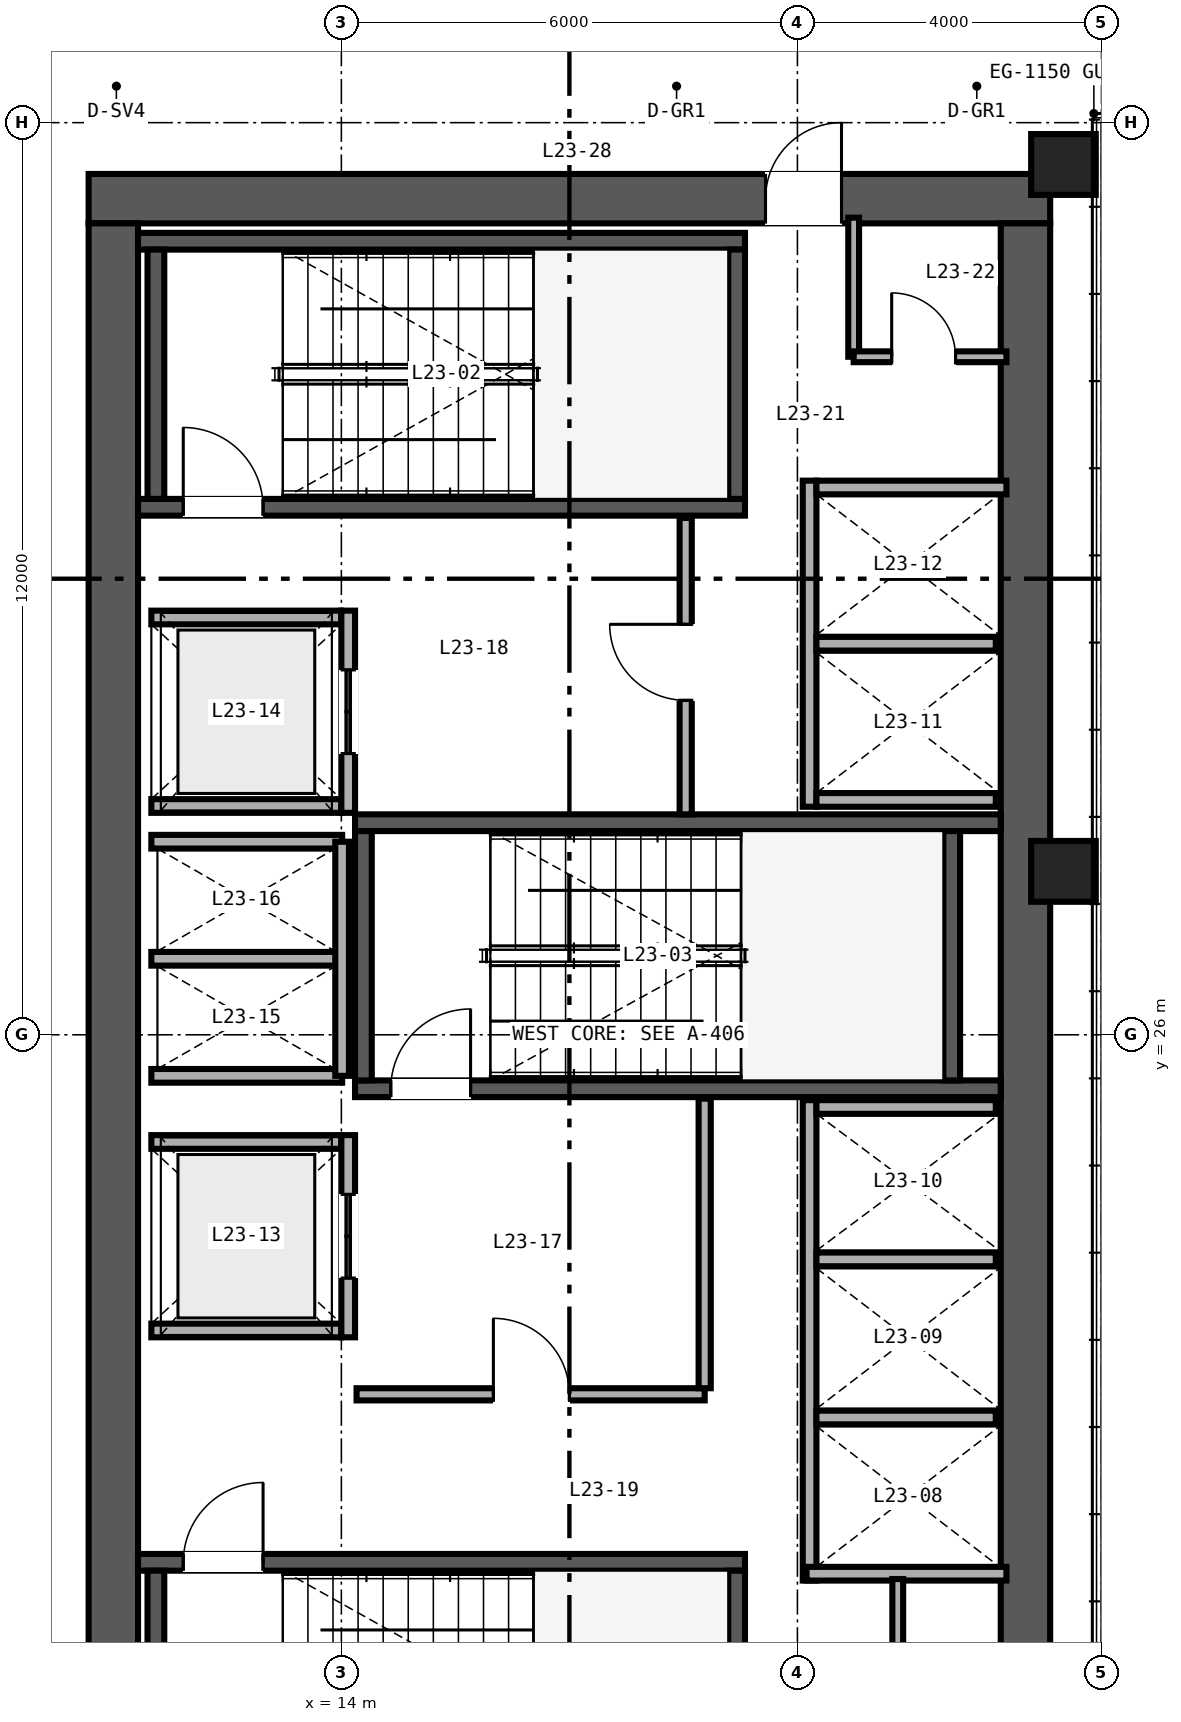
"""IFC4 building model, lengths in metres.
Left out: names, types, materials, properties, quantities, classifications, styles, units other than length and angle.
Written with IfcOpenShell. Run it as: python <this file> out.ifc"""

import sys

from ifc_helpers import new_model, si_unit, direction, frame, frame_2d, origin, origin_2d, place, context, subcontext, project, spatial, rectangle, hollow_rectangle, extrude, source, transform, mapped, element, fill, save


model = new_model("IFC4")
c1 = context("Model", 3, precision=1e-05, world=origin(), true_north=direction((0.0, 1.0)))
c2 = subcontext(c1, "Body", "Model", "MODEL_VIEW")
j1 = project(units=[si_unit("LENGTHUNIT", "METRE"), si_unit("PLANEANGLEUNIT", "RADIAN")], contexts=[c1])
p1 = place(None, origin())
s1 = spatial("IfcSite", under=j1, at=p1, CompositionType="ELEMENT")
p2 = place(p1, origin())
s2 = spatial("IfcBuilding", under=s1, at=p2, CompositionType="ELEMENT")
p3 = place(p2, frame((0.0, 0.0, 97.2)))
s3 = spatial("IfcBuildingStorey", under=s2, at=p3, CompositionType="ELEMENT", Elevation=97.2)
p4 = place(p3, frame((10.675, 37.0, 0.0), z_axis=(0.0, 0.0, 1.0), x_axis=(1.0, 0.0, 0.0)))
e1 = element("IfcWall", 1, at=p4, inside=s3, PredefinedType="SHEAR", context=c2, shape_type="SweptSolid", body=[
    extrude(rectangle(XDim=12.65, YDim=0.65, at=frame_2d((6.325, 0.0))), origin(), (0.0, 0.0, 1.0), 3.36),
])
p5 = place(p4, frame((8.905, 0.0, 0.0)))
e2 = element("IfcOpeningElement", 2, at=p5, cuts=e1, PredefinedType="OPENING", context=c2, shape_type="SweptSolid", body=[
    extrude(rectangle(XDim=1.0, YDim=2.15, at=frame_2d((0.5, 1.075))), frame((0.0, 0.335, 0.0), z_axis=(0.0, -1.0, 0.0), x_axis=(1.0, 0.0, 0.0)), (0.0, 0.0, 1.0), 0.67),
])
for number, where, z_axis, x_axis in (
    (3, (11.0, 15.325, 0.0), (0.0, 0.0, 1.0), (0.0, 1.0, 0.0)),
    (4, (23.0, 15.325, 0.0), (0.0, 0.0, 1.0), (0.0, 1.0, 0.0)),
):
    element("IfcWall", number, at=place(p3, frame(where, z_axis=z_axis, x_axis=x_axis)), inside=s3, PredefinedType="SHEAR", context=c2, shape_type="SweptSolid", body=[
        extrude(rectangle(XDim=21.35, YDim=0.65, at=frame_2d((10.675, 0.0))), origin(), (0.0, 0.0, 1.0), 3.36),
    ])
p6 = place(p3, frame((11.325, 19.06, 0.0), z_axis=(0.0, 0.0, 1.0), x_axis=(1.0, 0.0, 0.0)))
e5 = element("IfcWall", 5, at=p6, inside=s3, PredefinedType="SHEAR", context=c2, shape_type="SweptSolid", body=[
    extrude(rectangle(XDim=7.985, YDim=0.22, at=frame_2d((3.993, 0.0))), origin(), (0.0, 0.0, 1.0), 3.4),
])
p7 = place(p6, frame((0.595, 0.0, 0.0)))
e6 = element("IfcOpeningElement", 6, at=p7, cuts=e5, PredefinedType="OPENING", context=c2, shape_type="SweptSolid", body=[
    extrude(rectangle(XDim=1.05, YDim=2.15, at=frame_2d((0.525, 1.075))), frame((0.0, 0.12, 0.0), z_axis=(0.0, -1.0, 0.0), x_axis=(1.0, 0.0, 0.0)), (0.0, 0.0, 1.0), 0.24),
])
for number, where, z_axis, x_axis in (
    (7, (11.56, 15.67, 0.0), (0.0, 0.0, 1.0), (0.0, 1.0, 0.0)),
    (8, (19.2, 15.67, 0.0), (0.0, 0.0, 1.0), (0.0, 1.0, 0.0)),
):
    element("IfcWall", number, at=place(p3, frame(where, z_axis=z_axis, x_axis=x_axis)), inside=s3, PredefinedType="SHEAR", context=c2, shape_type="SweptSolid", body=[
        extrude(rectangle(XDim=3.28, YDim=0.22, at=frame_2d((1.64, 0.0))), origin(), (0.0, 0.0, 1.0), 3.4),
    ])
p8 = place(p3, frame((11.325, 32.94, 0.0), z_axis=(0.0, 0.0, 1.0), x_axis=(1.0, 0.0, 0.0)))
e9 = element("IfcWall", 9, at=p8, inside=s3, PredefinedType="SHEAR", context=c2, shape_type="SweptSolid", body=[
    extrude(rectangle(XDim=7.985, YDim=0.22, at=frame_2d((3.993, 0.0))), origin(), (0.0, 0.0, 1.0), 3.4),
])
p9 = place(p8, frame((0.595, 0.0, 0.0)))
e10 = element("IfcOpeningElement", 10, at=p9, cuts=e9, PredefinedType="OPENING", context=c2, shape_type="SweptSolid", body=[
    extrude(rectangle(XDim=1.05, YDim=2.15, at=frame_2d((0.525, 1.075))), frame((0.0, 0.12, 0.0), z_axis=(0.0, -1.0, 0.0), x_axis=(1.0, 0.0, 0.0)), (0.0, 0.0, 1.0), 0.24),
])
p10 = place(p3, frame((11.325, 36.44, 0.0), z_axis=(0.0, 0.0, 1.0), x_axis=(1.0, 0.0, 0.0)))
e11 = element("IfcWall", 11, at=p10, inside=s3, PredefinedType="SHEAR", context=c2, shape_type="SweptSolid", body=[
    extrude(rectangle(XDim=7.985, YDim=0.22, at=frame_2d((3.993, 0.0))), origin(), (0.0, 0.0, 1.0), 3.4),
])
for number, where, z_axis, x_axis in (
    (12, (11.56, 33.05, 0.0), (0.0, 0.0, 1.0), (0.0, 1.0, 0.0)),
    (13, (19.2, 33.05, 0.0), (0.0, 0.0, 1.0), (0.0, 1.0, 0.0)),
):
    element("IfcWall", number, at=place(p3, frame(where, z_axis=z_axis, x_axis=x_axis)), inside=s3, PredefinedType="SHEAR", context=c2, shape_type="SweptSolid", body=[
        extrude(rectangle(XDim=3.28, YDim=0.22, at=frame_2d((1.64, 0.0))), origin(), (0.0, 0.0, 1.0), 3.4),
    ])
p11 = place(p3, frame((14.18, 25.29, 0.0), z_axis=(0.0, 0.0, 1.0), x_axis=(1.0, 0.0, 0.0)))
e14 = element("IfcWall", 14, at=p11, inside=s3, PredefinedType="SHEAR", context=c2, shape_type="SweptSolid", body=[
    extrude(rectangle(XDim=8.495, YDim=0.22, at=frame_2d((4.248, 0.0))), origin(), (0.0, 0.0, 1.0), 3.4),
])
p12 = place(p11, frame((0.47, 0.0, 0.0)))
e15 = element("IfcOpeningElement", 15, at=p12, cuts=e14, PredefinedType="OPENING", context=c2, shape_type="SweptSolid", body=[
    extrude(rectangle(XDim=1.05, YDim=2.15, at=frame_2d((0.525, 1.075))), frame((0.0, 0.12, 0.0), z_axis=(0.0, -1.0, 0.0), x_axis=(1.0, 0.0, 0.0)), (0.0, 0.0, 1.0), 0.24),
])
p13 = place(p3, frame((14.18, 28.79, 0.0), z_axis=(0.0, 0.0, 1.0), x_axis=(1.0, 0.0, 0.0)))
e16 = element("IfcWall", 16, at=p13, inside=s3, PredefinedType="SHEAR", context=c2, shape_type="SweptSolid", body=[
    extrude(rectangle(XDim=8.495, YDim=0.22, at=frame_2d((4.248, 0.0))), origin(), (0.0, 0.0, 1.0), 3.4),
])
for number, where, z_axis, x_axis in (
    (17, (14.29, 25.4, 0.0), (0.0, 0.0, 1.0), (0.0, 1.0, 0.0)),
    (18, (22.03, 25.4, 0.0), (0.0, 0.0, 1.0), (0.0, 1.0, 0.0)),
):
    element("IfcWall", number, at=place(p3, frame(where, z_axis=z_axis, x_axis=x_axis)), inside=s3, PredefinedType="SHEAR", context=c2, shape_type="SweptSolid", body=[
        extrude(rectangle(XDim=3.28, YDim=0.22, at=frame_2d((1.64, 0.0))), origin(), (0.0, 0.0, 1.0), 3.4),
    ])
m1 = source(origin(), c2, "Body", "SweptSolid", [
    extrude(hollow_rectangle(XDim=0.85, YDim=0.8, WallThickness=0.032, at=origin_2d()), origin(), (0.0, 0.0, 1.0), 3.36),
])
for number, where, z_axis, x_axis in (
    (19, (23.5, 28.15, 0.0), (0.0, 0.0, 1.0), (1.0, 0.0, 0.0)),
    (20, (23.5, 37.45, 0.0), (0.0, 0.0, 1.0), (1.0, 0.0, 0.0)),
):
    element("IfcColumn", number, at=place(p3, frame(where, z_axis=z_axis, x_axis=x_axis)), inside=s3, PredefinedType="COLUMN", context=c2, shape_type="MappedRepresentation", body=[
        mapped(m1, transform((0.0, 0.0, 0.0), scale=1.0)),
    ])
p14 = place(p3, frame((20.16, 18.82, 0.0), z_axis=(0.0, 0.0, 1.0), x_axis=(0.0, 1.0, 0.0)))
e21 = element("IfcWall", 21, at=p14, inside=s3, PredefinedType="SOLIDWALL", context=c2, shape_type="SweptSolid", body=[
    extrude(rectangle(XDim=6.32, YDim=0.18, at=frame_2d((3.16, 0.0))), origin(), (0.0, 0.0, 1.0), 2.36),
])
p15 = place(p3, frame((20.12, 18.91, 0.0), z_axis=(0.0, 0.0, 1.0), x_axis=(1.0, 0.0, 0.0)))
e22 = element("IfcWall", 22, at=p15, inside=s3, PredefinedType="SOLIDWALL", context=c2, shape_type="SweptSolid", body=[
    extrude(rectangle(XDim=2.63, YDim=0.18, at=frame_2d((1.315, 0.0))), origin(), (0.0, 0.0, 1.0), 3.36),
])
p16 = place(p3, frame((20.25, 25.05, 0.0), z_axis=(0.0, 0.0, 1.0), x_axis=(1.0, 0.0, 0.0)))
e23 = element("IfcWall", 23, at=p16, inside=s3, PredefinedType="SOLIDWALL", context=c2, shape_type="SweptSolid", body=[
    extrude(rectangle(XDim=2.36, YDim=0.18, at=frame_2d((1.18, 0.0))), origin(), (0.0, 0.0, 1.0), 3.36),
])
p17 = place(p3, frame((20.25, 20.965, 0.0), z_axis=(0.0, 0.0, 1.0), x_axis=(1.0, 0.0, 0.0)))
e24 = element("IfcWall", 24, at=p17, inside=s3, PredefinedType="SOLIDWALL", context=c2, shape_type="SweptSolid", body=[
    extrude(rectangle(XDim=2.36, YDim=0.18, at=frame_2d((1.18, 0.0))), origin(), (0.0, 0.0, 1.0), 2.36),
])
p18 = place(p3, frame((20.25, 23.045, 0.0), z_axis=(0.0, 0.0, 1.0), x_axis=(1.0, 0.0, 0.0)))
e25 = element("IfcWall", 25, at=p18, inside=s3, PredefinedType="SOLIDWALL", context=c2, shape_type="SweptSolid", body=[
    extrude(rectangle(XDim=2.36, YDim=0.18, at=frame_2d((1.18, 0.0))), origin(), (0.0, 0.0, 1.0), 3.36),
])
p19 = place(p3, frame((20.16, 29.0, 0.0), z_axis=(0.0, 0.0, 1.0), x_axis=(0.0, 1.0, 0.0)))
e26 = element("IfcWall", 26, at=p19, inside=s3, PredefinedType="SOLIDWALL", context=c2, shape_type="SweptSolid", body=[
    extrude(rectangle(XDim=4.29, YDim=0.18, at=frame_2d((2.145, 0.0))), origin(), (0.0, 0.0, 1.0), 3.36),
])
p20 = place(p3, frame((20.25, 29.09, 0.0), z_axis=(0.0, 0.0, 1.0), x_axis=(1.0, 0.0, 0.0)))
e27 = element("IfcWall", 27, at=p20, inside=s3, PredefinedType="SOLIDWALL", context=c2, shape_type="SweptSolid", body=[
    extrude(rectangle(XDim=2.36, YDim=0.18, at=frame_2d((1.18, 0.0))), origin(), (0.0, 0.0, 1.0), 3.36),
])
p21 = place(p3, frame((20.25, 33.2, 0.0), z_axis=(0.0, 0.0, 1.0), x_axis=(1.0, 0.0, 0.0)))
e28 = element("IfcWall", 28, at=p21, inside=s3, PredefinedType="SOLIDWALL", context=c2, shape_type="SweptSolid", body=[
    extrude(rectangle(XDim=2.5, YDim=0.18, at=frame_2d((1.25, 0.0))), origin(), (0.0, 0.0, 1.0), 3.36),
])
p22 = place(p3, frame((20.25, 31.145, 0.0), z_axis=(0.0, 0.0, 1.0), x_axis=(1.0, 0.0, 0.0)))
e29 = element("IfcWall", 29, at=p22, inside=s3, PredefinedType="SOLIDWALL", context=c2, shape_type="SweptSolid", body=[
    extrude(rectangle(XDim=2.36, YDim=0.18, at=frame_2d((1.18, 0.0))), origin(), (0.0, 0.0, 1.0), 3.36),
])
for number, where, z_axis, x_axis in (
    (30, (11.5, 22.11, 0.0), (0.0, 0.0, 1.0), (1.0, 0.0, 0.0)),
    (31, (11.5, 24.59, 0.0), (0.0, 0.0, 1.0), (1.0, 0.0, 0.0)),
):
    element("IfcWall", number, at=place(p3, frame(where, z_axis=z_axis, x_axis=x_axis)), inside=s3, PredefinedType="SOLIDWALL", context=c2, shape_type="SweptSolid", body=[
        extrude(rectangle(XDim=2.5, YDim=0.18, at=frame_2d((1.25, 0.0))), origin(), (0.0, 0.0, 1.0), 3.36),
    ])
p23 = place(p3, frame((14.09, 22.02, 0.0), z_axis=(0.0, 0.0, 1.0), x_axis=(0.0, 1.0, 0.0)))
e32 = element("IfcWall", 32, at=p23, inside=s3, PredefinedType="SOLIDWALL", context=c2, shape_type="SweptSolid", body=[
    extrude(rectangle(XDim=2.66, YDim=0.18, at=frame_2d((1.33, 0.0))), origin(), (0.0, 0.0, 1.0), 3.36),
])
p24 = place(p23, frame((0.78, 0.0, 0.0)))
e33 = element("IfcOpeningElement", 33, at=p24, cuts=e32, PredefinedType="OPENING", context=c2, shape_type="SweptSolid", body=[
    extrude(rectangle(XDim=1.1, YDim=2.2, at=frame_2d((0.55, 1.1))), frame((0.0, 0.1, 0.0), z_axis=(0.0, -1.0, 0.0), x_axis=(1.0, 0.0, 0.0)), (0.0, 0.0, 1.0), 0.2),
])
for number, where, z_axis, x_axis in (
    (34, (11.5, 29.01, 0.0), (0.0, 0.0, 1.0), (1.0, 0.0, 0.0)),
    (35, (11.5, 31.49, 0.0), (0.0, 0.0, 1.0), (1.0, 0.0, 0.0)),
):
    element("IfcWall", number, at=place(p3, frame(where, z_axis=z_axis, x_axis=x_axis)), inside=s3, PredefinedType="SOLIDWALL", context=c2, shape_type="SweptSolid", body=[
        extrude(rectangle(XDim=2.5, YDim=0.18, at=frame_2d((1.25, 0.0))), origin(), (0.0, 0.0, 1.0), 3.36),
    ])
p25 = place(p3, frame((14.09, 28.92, 0.0), z_axis=(0.0, 0.0, 1.0), x_axis=(0.0, 1.0, 0.0)))
e36 = element("IfcWall", 36, at=p25, inside=s3, PredefinedType="SOLIDWALL", context=c2, shape_type="SweptSolid", body=[
    extrude(rectangle(XDim=2.66, YDim=0.18, at=frame_2d((1.33, 0.0))), origin(), (0.0, 0.0, 1.0), 3.36),
])
p26 = place(p25, frame((0.78, 0.0, 0.0)))
e37 = element("IfcOpeningElement", 37, at=p26, cuts=e36, PredefinedType="OPENING", context=c2, shape_type="SweptSolid", body=[
    extrude(rectangle(XDim=1.1, YDim=2.2, at=frame_2d((0.55, 1.1))), frame((0.0, 0.1, 0.0), z_axis=(0.0, -1.0, 0.0), x_axis=(1.0, 0.0, 0.0)), (0.0, 0.0, 1.0), 0.2),
])
for number, where, z_axis, x_axis in (
    (38, (11.5, 25.46, 0.0), (0.0, 0.0, 1.0), (1.0, 0.0, 0.0)),
    (39, (11.5, 27.0, 0.0), (0.0, 0.0, 1.0), (1.0, 0.0, 0.0)),
    (40, (11.5, 28.54, 0.0), (0.0, 0.0, 1.0), (1.0, 0.0, 0.0)),
):
    element("IfcWall", number, at=place(p3, frame(where, z_axis=z_axis, x_axis=x_axis)), inside=s3, PredefinedType="SOLIDWALL", context=c2, shape_type="SweptSolid", body=[
        extrude(rectangle(XDim=2.51, YDim=0.18, at=frame_2d((1.255, 0.0))), origin(), (0.0, 0.0, 1.0), 3.36),
    ])
p27 = place(p3, frame((14.01, 25.46, 0.0), z_axis=(0.0, 0.0, 1.0), x_axis=(0.0, 1.0, 0.0)))
e41 = element("IfcWall", 41, at=p27, inside=s3, PredefinedType="SOLIDWALL", context=c2, shape_type="SweptSolid", body=[
    extrude(rectangle(XDim=3.08, YDim=0.18, at=frame_2d((1.54, 0.0))), origin(), (0.0, 0.0, 1.0), 3.36),
])
p28 = place(p3, frame((14.2, 21.27, 0.0), z_axis=(0.0, 0.0, 1.0), x_axis=(1.0, 0.0, 0.0)))
e42 = element("IfcWall", 42, at=p28, inside=s3, PredefinedType="PARTITIONING", context=c2, shape_type="SweptSolid", body=[
    extrude(rectangle(XDim=4.58, YDim=0.16, at=frame_2d((2.29, 0.0))), origin(), (0.0, 0.0, 1.0), 3.36),
])
p29 = place(p28, frame((1.8, 0.0, 0.0)))
e43 = element("IfcOpeningElement", 43, at=p29, cuts=e42, PredefinedType="OPENING", context=c2, shape_type="SweptSolid", body=[
    extrude(rectangle(XDim=1.0, YDim=2.15, at=frame_2d((0.5, 1.075))), frame((0.0, 0.09, 0.0), z_axis=(0.0, -1.0, 0.0), x_axis=(1.0, 0.0, 0.0)), (0.0, 0.0, 1.0), 0.18),
])
p30 = place(p3, frame((18.78, 21.35, 0.0), z_axis=(0.0, 0.0, 1.0), x_axis=(0.0, 1.0, 0.0)))
e44 = element("IfcWall", 44, at=p30, inside=s3, PredefinedType="PARTITIONING", context=c2, shape_type="SweptSolid", body=[
    extrude(rectangle(XDim=3.81, YDim=0.16, at=frame_2d((1.905, 0.0))), origin(), (0.0, 0.0, 1.0), 3.36),
])
p31 = place(p3, frame((18.53, 28.9, 0.0), z_axis=(0.0, 0.0, 1.0), x_axis=(0.0, 1.0, 0.0)))
e45 = element("IfcWall", 45, at=p31, inside=s3, PredefinedType="PARTITIONING", context=c2, shape_type="SweptSolid", body=[
    extrude(rectangle(XDim=3.9, YDim=0.16, at=frame_2d((1.95, 0.0))), origin(), (0.0, 0.0, 1.0), 3.36),
])
p32 = place(p31, frame((1.5, 0.0, 0.0)))
e46 = element("IfcOpeningElement", 46, at=p32, cuts=e45, PredefinedType="OPENING", context=c2, shape_type="SweptSolid", body=[
    extrude(rectangle(XDim=1.0, YDim=2.15, at=frame_2d((0.5, 1.075))), frame((0.0, 0.09, 0.0), z_axis=(0.0, -1.0, 0.0), x_axis=(1.0, 0.0, 0.0)), (0.0, 0.0, 1.0), 0.18),
])
p33 = place(p3, frame((21.32, 15.25, 0.0), z_axis=(0.0, 0.0, 1.0), x_axis=(0.0, 1.0, 0.0)))
e47 = element("IfcWall", 47, at=p33, inside=s3, PredefinedType="PARTITIONING", context=c2, shape_type="SweptSolid", body=[
    extrude(rectangle(XDim=3.59, YDim=0.142, at=frame_2d((1.795, 0.0))), origin(), (0.0, 0.0, 1.0), 3.36),
])
p34 = place(p33, frame((1.25, 0.0, 0.0)))
e48 = element("IfcOpeningElement", 48, at=p34, cuts=e47, PredefinedType="OPENING", context=c2, shape_type="SweptSolid", body=[
    extrude(rectangle(XDim=0.84, YDim=2.1, at=frame_2d((0.42, 1.05))), frame((0.0, 0.081, 0.0), z_axis=(0.0, -1.0, 0.0), x_axis=(1.0, 0.0, 0.0)), (0.0, 0.0, 1.0), 0.162),
])
p35 = place(p3, frame((20.74, 34.92, 0.0), z_axis=(0.0, 0.0, 1.0), x_axis=(0.0, 1.0, 0.0)))
e49 = element("IfcWall", 49, at=p35, inside=s3, PredefinedType="PARTITIONING", context=c2, shape_type="SweptSolid", body=[
    extrude(rectangle(XDim=1.83, YDim=0.142, at=frame_2d((0.915, 0.0))), origin(), (0.0, 0.0, 1.0), 3.36),
])
p36 = place(p3, frame((20.74, 34.92, 0.0), z_axis=(0.0, 0.0, 1.0), x_axis=(1.0, 0.0, 0.0)))
e50 = element("IfcWall", 50, at=p36, inside=s3, PredefinedType="PARTITIONING", context=c2, shape_type="SweptSolid", body=[
    extrude(rectangle(XDim=2.01, YDim=0.142, at=frame_2d((1.005, 0.0))), origin(), (0.0, 0.0, 1.0), 3.36),
])
p37 = place(p36, frame((0.5, 0.0, 0.0)))
e51 = element("IfcOpeningElement", 51, at=p37, cuts=e50, PredefinedType="OPENING", context=c2, shape_type="SweptSolid", body=[
    extrude(rectangle(XDim=0.84, YDim=2.1, at=frame_2d((0.42, 1.05))), frame((0.0, 0.081, 0.0), z_axis=(0.0, -1.0, 0.0), x_axis=(1.0, 0.0, 0.0)), (0.0, 0.0, 1.0), 0.162),
])
m2 = source(origin(), c2, "Body", "SweptSolid", [
    extrude(rectangle(XDim=1.05, YDim=2.15, at=frame_2d((0.525, 1.075))), frame((0.0, 0.025, 0.0), z_axis=(0.0, -1.0, 0.0), x_axis=(1.0, 0.0, 0.0)), (0.0, 0.0, 1.0), 0.05),
])
p38 = place(p7, origin())
e52 = element("IfcDoor", 52, at=p38, inside=s3, OperationType="SINGLE_SWING_RIGHT", PredefinedType="DOOR", context=c2, shape_type="MappedRepresentation", body=[
    mapped(m2, transform((0.0, 0.0, 0.0), scale=1.0)),
])
fill(e6, e52)
p39 = place(p9, origin())
e53 = element("IfcDoor", 53, at=p39, inside=s3, OperationType="SINGLE_SWING_LEFT", PredefinedType="DOOR", context=c2, shape_type="MappedRepresentation", body=[
    mapped(m2, transform((0.0, 0.0, 0.0), scale=1.0)),
])
fill(e10, e53)
p40 = place(p12, origin())
e54 = element("IfcDoor", 54, at=p40, inside=s3, OperationType="SINGLE_SWING_RIGHT", PredefinedType="DOOR", context=c2, shape_type="MappedRepresentation", body=[
    mapped(m2, transform((0.0, 0.0, 0.0), scale=1.0)),
])
fill(e15, e54)
m3 = source(origin(), c2, "Body", "SweptSolid", [
    extrude(rectangle(XDim=1.1, YDim=2.2, at=frame_2d((0.55, 1.1))), frame((0.0, 0.025, 0.0), z_axis=(0.0, -1.0, 0.0), x_axis=(1.0, 0.0, 0.0)), (0.0, 0.0, 1.0), 0.05),
])
p41 = place(p24, origin())
e55 = element("IfcDoor", 55, at=p41, inside=s3, OperationType="DOUBLE_DOOR_SLIDING", PredefinedType="DOOR", context=c2, shape_type="MappedRepresentation", body=[
    mapped(m3, transform((0.0, 0.0, 0.0), scale=1.0)),
])
fill(e33, e55)
p42 = place(p26, origin())
e56 = element("IfcDoor", 56, at=p42, inside=s3, OperationType="DOUBLE_DOOR_SLIDING", PredefinedType="DOOR", context=c2, shape_type="MappedRepresentation", body=[
    mapped(m3, transform((0.0, 0.0, 0.0), scale=1.0)),
])
fill(e37, e56)
m4 = source(origin(), c2, "Body", "SweptSolid", [
    extrude(rectangle(XDim=1.0, YDim=2.15, at=frame_2d((0.5, 1.075))), frame((0.0, 0.025, 0.0), z_axis=(0.0, -1.0, 0.0), x_axis=(1.0, 0.0, 0.0)), (0.0, 0.0, 1.0), 0.05),
])
p43 = place(p29, origin())
e57 = element("IfcDoor", 57, at=p43, inside=s3, OperationType="SINGLE_SWING_LEFT", PredefinedType="DOOR", context=c2, shape_type="MappedRepresentation", body=[
    mapped(m4, transform((0.0, 0.0, 0.0), scale=1.0)),
])
fill(e43, e57)
p44 = place(p32, origin())
e58 = element("IfcDoor", 58, at=p44, inside=s3, OperationType="SINGLE_SWING_RIGHT", PredefinedType="DOOR", context=c2, shape_type="MappedRepresentation", body=[
    mapped(m4, transform((0.0, 0.0, 0.0), scale=1.0)),
])
fill(e46, e58)
m5 = source(origin(), c2, "Body", "SweptSolid", [
    extrude(rectangle(XDim=0.84, YDim=2.1, at=frame_2d((0.42, 1.05))), frame((0.0, 0.025, 0.0), z_axis=(0.0, -1.0, 0.0), x_axis=(1.0, 0.0, 0.0)), (0.0, 0.0, 1.0), 0.05),
])
p45 = place(p37, origin())
e59 = element("IfcDoor", 59, at=p45, inside=s3, OperationType="SINGLE_SWING_LEFT", PredefinedType="DOOR", context=c2, shape_type="MappedRepresentation", body=[
    mapped(m5, transform((0.0, 0.0, 0.0), scale=1.0)),
])
fill(e51, e59)
p46 = place(p5, origin())
e60 = element("IfcDoor", 60, at=p46, inside=s3, OperationType="SINGLE_SWING_RIGHT", PredefinedType="DOOR", context=c2, shape_type="MappedRepresentation", body=[
    mapped(m4, transform((0.0, 0.0, 0.0), scale=1.0)),
])
fill(e2, e60)
save(model, sys.argv[1])
